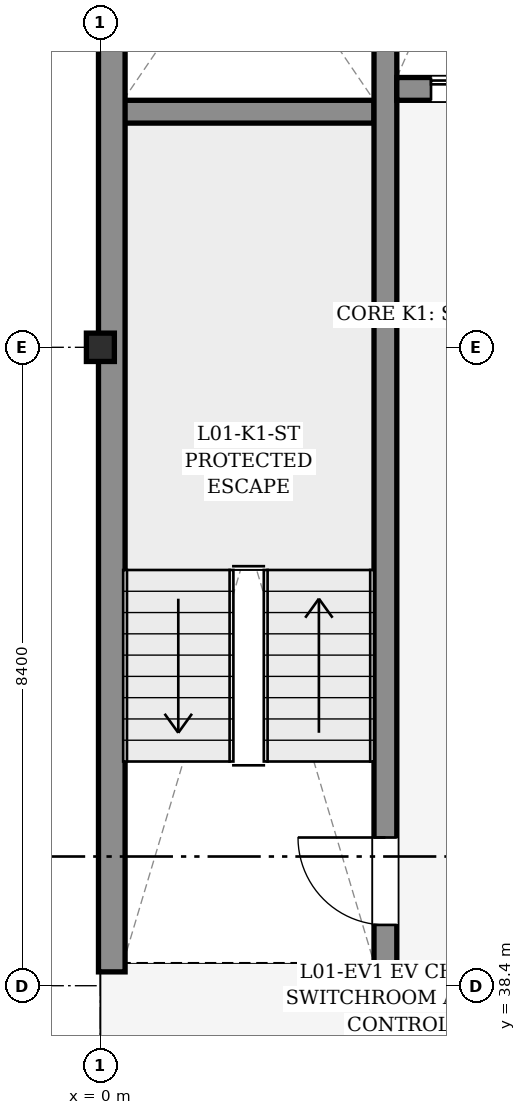
"""IFC4 building model, lengths in metres.
Left out: names, types, materials, properties, quantities, classifications, styles, units other than length and angle.
Written with IfcOpenShell. Run it as: python <this file> out.ifc"""

import sys

from ifc_helpers import new_model, si_unit, direction, frame, frame_2d, origin, origin_2d, place, context, subcontext, project, spatial, rectangle, i_section, extrude, element, fill, save


model = new_model("IFC4")
c1 = context("Model", 3, precision=1e-05, world=origin(), true_north=direction((0.0, 1.0)))
c2 = subcontext(c1, "Body", "Model", "MODEL_VIEW")
j1 = project(units=[si_unit("LENGTHUNIT", "METRE"), si_unit("PLANEANGLEUNIT", "RADIAN")], contexts=[c1])
p1 = place(None, origin())
s1 = spatial("IfcSite", under=j1, at=p1, CompositionType="ELEMENT")
p2 = place(p1, origin())
s2 = spatial("IfcBuilding", under=s1, at=p2, CompositionType="ELEMENT")
p3 = place(p2, frame((0.0, 0.0, 5.4)))
s3 = spatial("IfcBuildingStorey", under=s2, at=p3, CompositionType="ELEMENT", Elevation=5.4)
for number, where, z_axis, x_axis in (
    (1, (0.0, 38.4, 0.0), (0.0, 0.0, 1.0), (1.0, 0.0, 0.0)),
    (2, (0.0, 46.8, 0.0), (0.0, 0.0, 1.0), (1.0, 0.0, 0.0)),
):
    element("IfcColumn", number, at=place(p3, frame(where, z_axis=z_axis, x_axis=x_axis)), inside=s3, PredefinedType="COLUMN", context=c2, shape_type="SweptSolid", body=[
        extrude(i_section(OverallWidth=0.373, OverallDepth=0.368, WebThickness=0.014, FlangeThickness=0.024, FilletRadius=0.015, at=origin_2d()), origin(), (0.0, 0.0, 1.0), 3.6),
    ])
p4 = place(p3, frame((0.185, 38.55, 0.0), z_axis=(0.0, 0.0, 1.0), x_axis=(1.0, 0.0, 0.0)))
e3 = element("IfcWall", 3, at=p4, inside=s3, PredefinedType="SHEAR", context=c2, shape_type="SweptSolid", body=[
    extrude(rectangle(XDim=8.031, YDim=0.3, at=frame_2d((4.016, 0.0))), origin(), (0.0, 0.0, 1.0), 3.38),
])
p5 = place(p3, frame((0.3, 49.9, 0.0), z_axis=(0.0, 0.0, 1.0), x_axis=(1.0, 0.0, 0.0)))
e4 = element("IfcWall", 4, at=p5, inside=s3, PredefinedType="SHEAR", context=c2, shape_type="SweptSolid", body=[
    extrude(rectangle(XDim=3.3, YDim=0.3, at=frame_2d((1.65, 0.0))), origin(), (0.0, 0.0, 1.0), 3.38),
])
p6 = place(p3, frame((0.15, 38.582, 0.0), z_axis=(0.0, 0.0, 1.0), x_axis=(0.0, 1.0, 0.0)))
e5 = element("IfcWall", 5, at=p6, inside=s3, PredefinedType="SHEAR", context=c2, shape_type="SweptSolid", body=[
    extrude(rectangle(XDim=16.436, YDim=0.35, at=frame_2d((8.218, 0.0))), origin(), (0.0, 0.0, 1.0), 3.38),
])
p7 = place(p3, frame((3.75, 38.7, 0.0), z_axis=(0.0, 0.0, 1.0), x_axis=(0.0, 1.0, 0.0)))
e6 = element("IfcWall", 6, at=p7, inside=s3, PredefinedType="SHEAR", context=c2, shape_type="SweptSolid", body=[
    extrude(rectangle(XDim=16.2, YDim=0.3, at=frame_2d((8.1, 0.0))), origin(), (0.0, 0.0, 1.0), 3.38),
])
p8 = place(p7, frame((0.5, 0.0, 0.0)))
e7 = element("IfcOpeningElement", 7, at=p8, cuts=e6, PredefinedType="OPENING", context=c2, shape_type="SweptSolid", body=[
    extrude(rectangle(XDim=1.15, YDim=2.15, at=frame_2d((0.575, 1.075))), frame((0.0, 0.16, 0.0), z_axis=(0.0, -1.0, 0.0), x_axis=(1.0, 0.0, 0.0)), (0.0, 0.0, 1.0), 0.32),
])
p9 = place(p3, frame((3.9, 50.2, 0.0), z_axis=(0.0, 0.0, 1.0), x_axis=(1.0, 0.0, 0.0)))
e8 = element("IfcWall", 8, at=p9, inside=s3, PredefinedType="SHEAR", context=c2, shape_type="SweptSolid", body=[
    extrude(rectangle(XDim=4.2, YDim=0.3, at=frame_2d((2.1, 0.0))), origin(), (0.0, 0.0, 1.0), 3.38),
])
p10 = place(p9, frame((0.45, 0.0, 0.0)))
e9 = element("IfcOpeningElement", 9, at=p10, cuts=e8, PredefinedType="OPENING", context=c2, shape_type="SweptSolid", body=[
    extrude(rectangle(XDim=1.1, YDim=2.2, at=frame_2d((0.55, 1.1))), frame((0.0, 0.16, 0.0), z_axis=(0.0, -1.0, 0.0), x_axis=(1.0, 0.0, 0.0)), (0.0, 0.0, 1.0), 0.32),
])
p11 = place(p9, frame((2.65, 0.0, 0.0)))
e10 = element("IfcOpeningElement", 10, at=p11, cuts=e8, PredefinedType="OPENING", context=c2, shape_type="SweptSolid", body=[
    extrude(rectangle(XDim=1.1, YDim=2.2, at=frame_2d((0.55, 1.1))), frame((0.0, 0.16, 0.0), z_axis=(0.0, -1.0, 0.0), x_axis=(1.0, 0.0, 0.0)), (0.0, 0.0, 1.0), 0.32),
])
p12 = place(p8, frame((1.15, 0.0, 0.0), z_axis=(0.0, 0.0, 1.0), x_axis=(-1.0, 0.0, 0.0)))
e11 = element("IfcDoor", 11, at=p12, inside=s3, OperationType="SINGLE_SWING_LEFT", PredefinedType="DOOR", context=c2, shape_type="SweptSolid", body=[
    extrude(rectangle(XDim=1.15, YDim=2.15, at=frame_2d((0.575, 1.075))), frame((0.0, 0.025, 0.0), z_axis=(0.0, -1.0, 0.0), x_axis=(1.0, 0.0, 0.0)), (0.0, 0.0, 1.0), 0.05),
])
fill(e7, e11)
p13 = place(p10, origin())
e12 = element("IfcDoor", 12, at=p13, inside=s3, OperationType="SLIDING_TO_LEFT", PredefinedType="DOOR", context=c2, shape_type="SweptSolid", body=[
    extrude(rectangle(XDim=1.1, YDim=2.2, at=frame_2d((0.55, 1.1))), frame((0.0, 0.025, 0.0), z_axis=(0.0, -1.0, 0.0), x_axis=(1.0, 0.0, 0.0)), (0.0, 0.0, 1.0), 0.05),
])
fill(e9, e12)
save(model, sys.argv[1])
